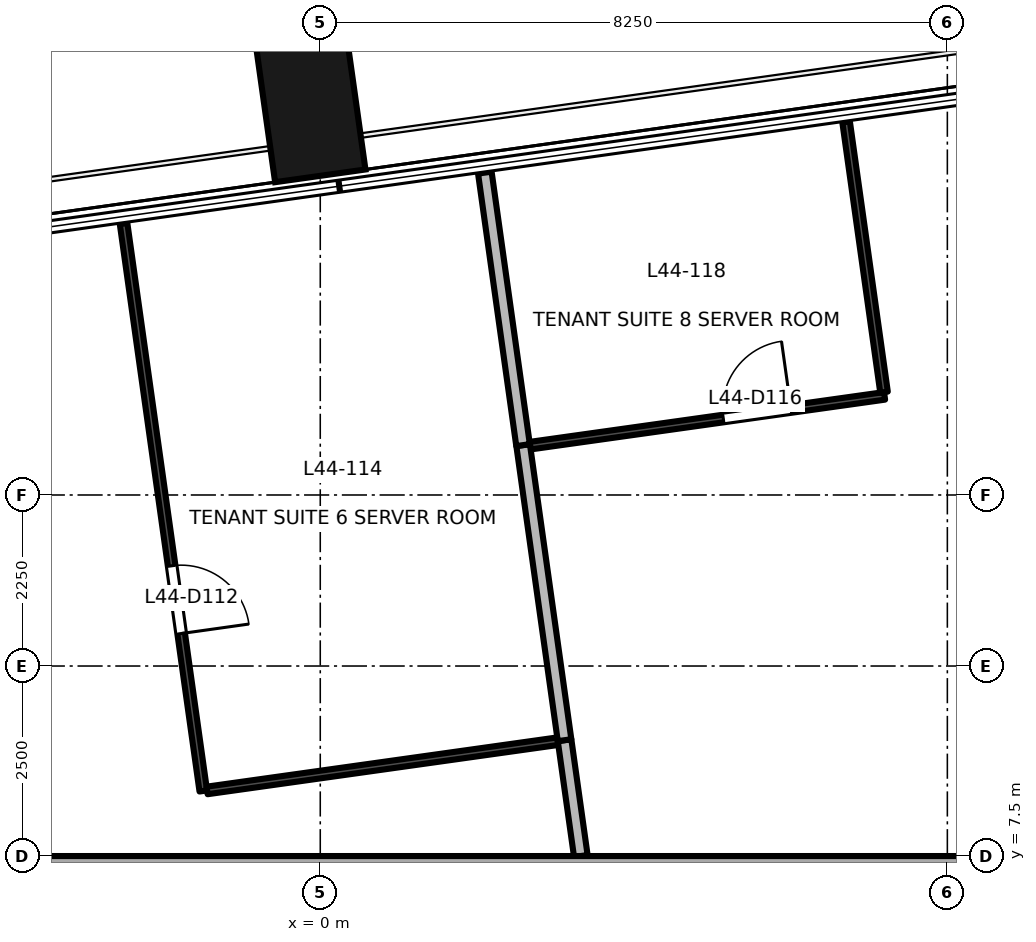
"""IFC4 building model, lengths in metres.
Left out: names, types, materials, properties, quantities, classifications, styles, units other than length and angle.
Written with IfcOpenShell. Run it as: python <this file> out.ifc"""

import sys

from ifc_helpers import new_model, si_unit, direction, frame, frame_2d, origin, origin_2d, place, context, subcontext, project, spatial, rectangle, extrude, element, fill, save


model = new_model("IFC4")
c1 = context("Model", 3, precision=1e-05, world=origin(), true_north=direction((0.0, 1.0)))
c2 = subcontext(c1, "Body", "Model", "MODEL_VIEW")
j1 = project(units=[si_unit("LENGTHUNIT", "METRE"), si_unit("PLANEANGLEUNIT", "RADIAN")], contexts=[c1])
p1 = place(None, origin())
s1 = spatial("IfcSite", under=j1, at=p1, CompositionType="ELEMENT")
p2 = place(p1, origin())
s2 = spatial("IfcBuilding", under=s1, at=p2, CompositionType="ELEMENT")
p3 = place(p2, frame((0.0, 0.0, 191.9)))
s3 = spatial("IfcBuildingStorey", under=s2, at=p3, CompositionType="ELEMENT", Elevation=191.9)
p4 = place(p3, frame((-0.125, 17.34, -0.2), z_axis=(0.0, 0.0, 1.0), x_axis=(0.99027049762, 0.139155817501, 0.0)))
e1 = element("IfcColumn", 1, at=p4, inside=s3, PredefinedType="COLUMN", context=c2, shape_type="SweptSolid", body=[
    extrude(rectangle(XDim=1.2, YDim=1.8, at=origin_2d()), origin(), (0.0, 0.0, 1.0), 3.9),
])
p5 = place(p3, frame((-18.0, 7.05, -0.2), z_axis=(0.0, 0.0, 1.0), x_axis=(1.0, 0.0, 0.0)))
e2 = element("IfcWall", 2, at=p5, inside=s3, PredefinedType="SHEAR", context=c2, shape_type="SweptSolid", body=[
    extrude(rectangle(XDim=36.0, YDim=0.9, at=frame_2d((18.0, 0.0))), origin(), (0.0, 0.0, 1.0), 3.9),
])
p6 = place(p3, frame((-2.588, 15.822, 0.0), z_axis=(0.0, 0.0, 1.0), x_axis=(0.139113424861, -0.990276453837, 0.0)))
e3 = element("IfcWall", 3, at=p6, inside=s3, PredefinedType="PARTITIONING", context=c2, shape_type="SweptSolid", body=[
    extrude(rectangle(XDim=7.539, YDim=0.1, at=frame_2d((3.77, 0.0))), origin(), (0.0, 0.0, 1.0), 3.7),
])
p7 = place(p6, frame((4.548, 0.0, 0.0)))
e4 = element("IfcOpeningElement", 4, at=p7, cuts=e3, PredefinedType="OPENING", context=c2, shape_type="SweptSolid", body=[
    extrude(rectangle(XDim=0.9, YDim=2.1, at=frame_2d((0.45, 1.05))), frame((0.0, 0.061, 0.0), z_axis=(0.0, -1.0, 0.0), x_axis=(1.0, 0.0, 0.0)), (0.0, 0.0, 1.0), 0.121),
])
p8 = place(p3, frame((-1.489, 8.363, 0.0), z_axis=(0.0, 0.0, 1.0), x_axis=(0.990283092648, 0.139066158415, 0.0)))
e5 = element("IfcWall", 5, at=p8, inside=s3, PredefinedType="PARTITIONING", context=c2, shape_type="SweptSolid", body=[
    extrude(rectangle(XDim=4.659, YDim=0.1, at=frame_2d((2.33, 0.0))), origin(), (0.0, 0.0, 1.0), 3.25),
])
p9 = place(p3, frame((3.214, 9.024, 0.0), z_axis=(0.0, 0.0, 1.0), x_axis=(0.138977710078, -0.990295509483, 0.0)))
e6 = element("IfcWall", 6, at=p9, inside=s3, PredefinedType="PARTITIONING", context=c2, shape_type="SweptSolid", body=[
    extrude(rectangle(XDim=1.539, YDim=0.18, at=frame_2d((0.77, 0.0))), origin(), (0.0, 0.0, 1.0), 3.7),
])
p10 = place(p3, frame((2.669, 12.906, 0.0), z_axis=(0.0, 0.0, 1.0), x_axis=(0.139066846741, -0.990282995985, 0.0)))
e7 = element("IfcWall", 7, at=p10, inside=s3, PredefinedType="PARTITIONING", context=c2, shape_type="SweptSolid", body=[
    extrude(rectangle(XDim=3.92, YDim=0.18, at=frame_2d((1.96, 0.0))), origin(), (0.0, 0.0, 1.0), 3.7),
])
p11 = place(p3, frame((2.165, 16.491, 0.0), z_axis=(0.0, 0.0, 1.0), x_axis=(0.138928291597, -0.990302443597, 0.0)))
e8 = element("IfcWall", 8, at=p11, inside=s3, PredefinedType="PARTITIONING", context=c2, shape_type="SweptSolid", body=[
    extrude(rectangle(XDim=3.62, YDim=0.18, at=frame_2d((1.81, 0.0))), origin(), (0.0, 0.0, 1.0), 3.7),
])
p12 = place(p3, frame((2.761, 12.899, 0.0), z_axis=(0.0, 0.0, 1.0), x_axis=(0.990277569518, 0.139105482671, 0.0)))
e9 = element("IfcWall", 9, at=p12, inside=s3, PredefinedType="PARTITIONING", context=c2, shape_type="SweptSolid", body=[
    extrude(rectangle(XDim=4.709, YDim=0.1, at=frame_2d((2.354, 0.0))), origin(), (0.0, 0.0, 1.0), 3.25),
])
p13 = place(p12, frame((2.566, 0.0, 0.0)))
e10 = element("IfcOpeningElement", 10, at=p13, cuts=e9, PredefinedType="OPENING", context=c2, shape_type="SweptSolid", body=[
    extrude(rectangle(XDim=0.9, YDim=2.1, at=frame_2d((0.45, 1.05))), frame((0.0, 0.061, 0.0), z_axis=(0.0, -1.0, 0.0), x_axis=(1.0, 0.0, 0.0)), (0.0, 0.0, 1.0), 0.121),
])
p14 = place(p3, frame((7.417, 13.603, 0.0), z_axis=(0.0, 0.0, 1.0), x_axis=(-0.139012030438, 0.990290692369, 0.0)))
e11 = element("IfcWall", 11, at=p14, inside=s3, PredefinedType="PARTITIONING", context=c2, shape_type="SweptSolid", body=[
    extrude(rectangle(XDim=3.59, YDim=0.1, at=frame_2d((1.795, 0.0))), origin(), (0.0, 0.0, 1.0), 3.7),
])
p15 = place(p7, origin())
e12 = element("IfcDoor", 12, at=p15, inside=s3, OperationType="SINGLE_SWING_RIGHT", PredefinedType="DOOR", context=c2, shape_type="SweptSolid", body=[
    extrude(rectangle(XDim=0.9, YDim=2.1, at=frame_2d((0.45, 1.05))), frame((0.0, 0.025, 0.0), z_axis=(0.0, -1.0, 0.0), x_axis=(1.0, 0.0, 0.0)), (0.0, 0.0, 1.0), 0.05),
])
fill(e4, e12)
p16 = place(p13, origin())
e13 = element("IfcDoor", 13, at=p16, inside=s3, OperationType="SINGLE_SWING_RIGHT", PredefinedType="DOOR", context=c2, shape_type="SweptSolid", body=[
    extrude(rectangle(XDim=0.9, YDim=2.1, at=frame_2d((0.45, 1.05))), frame((0.0, 0.025, 0.0), z_axis=(0.0, -1.0, 0.0), x_axis=(1.0, 0.0, 0.0)), (0.0, 0.0, 1.0), 0.05),
])
fill(e10, e13)
save(model, sys.argv[1])
